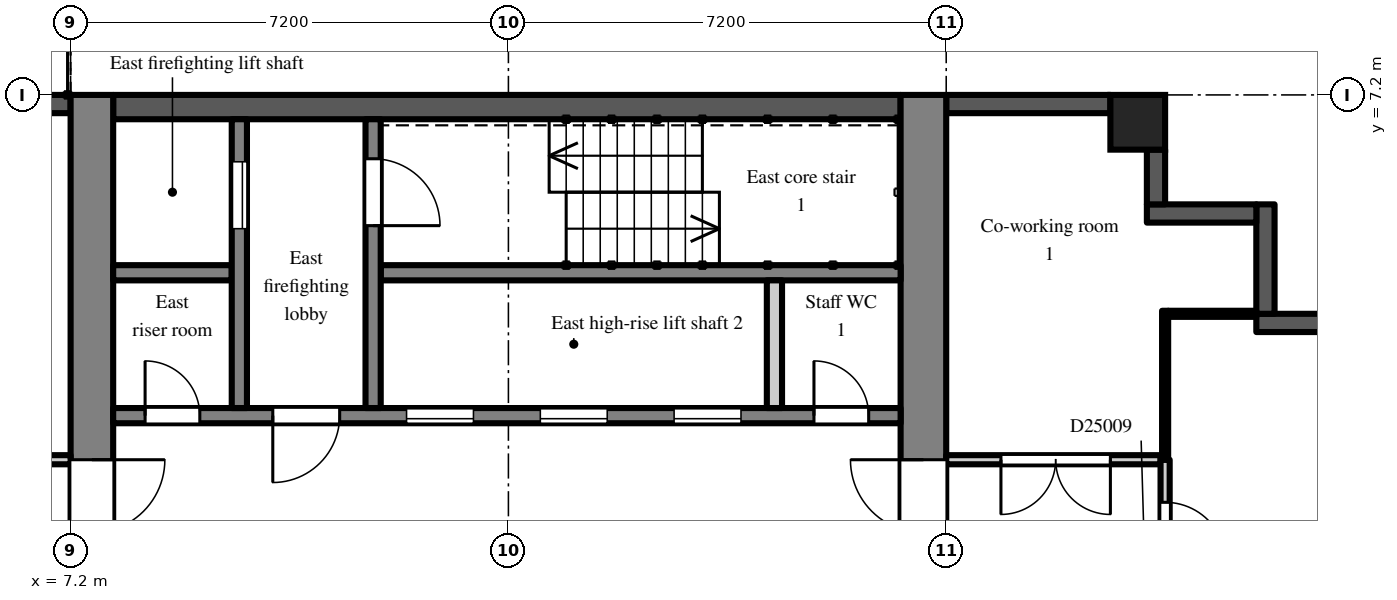
"""IFC4 building model, lengths in metres.
Left out: names, types, materials, properties, quantities, classifications, styles, units other than length and angle.
Written with IfcOpenShell. Run it as: python <this file> out.ifc"""

import sys

from ifc_helpers import new_model, si_unit, direction, frame, frame_2d, origin, origin_2d, place, context, subcontext, project, spatial, rectangle, extrude, element, fill, save


model = new_model("IFC4")
c1 = context("Model", 3, precision=1e-05, world=origin(), true_north=direction((0.0, 1.0)))
c2 = subcontext(c1, "Body", "Model", "MODEL_VIEW")
j1 = project(units=[si_unit("LENGTHUNIT", "METRE"), si_unit("PLANEANGLEUNIT", "RADIAN")], contexts=[c1])
p1 = place(None, origin())
s1 = spatial("IfcSite", under=j1, at=p1, CompositionType="ELEMENT")
p2 = place(p1, origin())
s2 = spatial("IfcBuilding", under=s1, at=p2, CompositionType="ELEMENT")
p3 = place(p2, frame((0.0, 0.0, 170.7)))
s3 = spatial("IfcBuildingStorey", under=s2, at=p3, CompositionType="ELEMENT", Elevation=170.7)
p4 = place(p3, frame((24.75, 6.75, 0.0), z_axis=(0.0, 0.0, 1.0), x_axis=(1.0, 0.0, 0.0)))
e1 = element("IfcColumn", 1, at=p4, inside=s3, PredefinedType="COLUMN", context=c2, shape_type="SweptSolid", body=[
    extrude(rectangle(XDim=0.9, YDim=0.9, at=origin_2d()), origin(), (0.0, 0.0, 1.0), 3.0),
])
p5 = place(p3, frame((27.9, 3.45, 0.0), z_axis=(0.0, 0.0, 1.0), x_axis=(-1.0, 0.0, 0.0)))
e2 = element("IfcWall", 2, at=p5, inside=s3, PredefinedType="SOLIDWALL", context=c2, shape_type="SweptSolid", body=[
    extrude(rectangle(XDim=1.2, YDim=0.3, at=frame_2d((0.6, 0.0))), origin(), (0.0, 0.0, 1.0), 2.6),
])
p6 = place(p3, frame((26.85, 3.6, 0.0), z_axis=(0.0, 0.0, 1.0), x_axis=(0.0, 1.0, 0.0)))
e3 = element("IfcWall", 3, at=p6, inside=s3, PredefinedType="SOLIDWALL", context=c2, shape_type="SweptSolid", body=[
    extrude(rectangle(XDim=1.8, YDim=0.3, at=frame_2d((0.9, 0.0))), origin(), (0.0, 0.0, 1.0), 2.6),
])
p7 = place(p3, frame((26.7, 5.25, 0.0), z_axis=(0.0, 0.0, 1.0), x_axis=(-1.0, 0.0, 0.0)))
e4 = element("IfcWall", 4, at=p7, inside=s3, PredefinedType="SOLIDWALL", context=c2, shape_type="SweptSolid", body=[
    extrude(rectangle(XDim=1.8, YDim=0.3, at=frame_2d((0.9, 0.0))), origin(), (0.0, 0.0, 1.0), 2.6),
])
p8 = place(p3, frame((25.05, 5.4, 0.0), z_axis=(0.0, 0.0, 1.0), x_axis=(0.0, 1.0, 0.0)))
e5 = element("IfcWall", 5, at=p8, inside=s3, PredefinedType="SOLIDWALL", context=c2, shape_type="SweptSolid", body=[
    extrude(rectangle(XDim=0.9, YDim=0.3, at=frame_2d((0.45, 0.0))), origin(), (0.0, 0.0, 1.0), 2.6),
])
p9 = place(p3, frame((24.3, 7.05, 0.0), z_axis=(0.0, 0.0, 1.0), x_axis=(-1.0, 0.0, 0.0)))
e6 = element("IfcWall", 6, at=p9, inside=s3, PredefinedType="SOLIDWALL", context=c2, shape_type="SweptSolid", body=[
    extrude(rectangle(XDim=2.7, YDim=0.3, at=frame_2d((1.35, 0.0))), origin(), (0.0, 0.0, 1.0), 2.2),
])
p10 = place(p3, frame((7.2, 7.05, 0.0), z_axis=(0.0, 0.0, 1.0), x_axis=(-1.0, 0.0, 0.0)))
e7 = element("IfcWall", 7, at=p10, inside=s3, PredefinedType="SOLIDWALL", context=c2, shape_type="SweptSolid", body=[
    extrude(rectangle(XDim=3.0, YDim=0.3, at=frame_2d((1.5, 0.0))), origin(), (0.0, 0.0, 1.0), 2.2),
])
p11 = place(p3, frame((7.55, -7.2, 0.0), z_axis=(0.0, 0.0, 1.0), x_axis=(0.0, 1.0, 0.0)))
e8 = element("IfcWall", 8, at=p11, inside=s3, PredefinedType="SHEAR", context=c2, shape_type="SweptSolid", body=[
    extrude(rectangle(XDim=14.4, YDim=0.7, at=frame_2d((7.2, 0.0))), origin(), (0.0, 0.0, 1.0), 2.6),
])
p12 = place(p11, frame((6.0, 0.0, 0.0)))
e9 = element("IfcOpeningElement", 9, at=p12, cuts=e8, PredefinedType="OPENING", context=c2, shape_type="SweptSolid", body=[
    extrude(rectangle(XDim=2.4, YDim=2.2, at=frame_2d((1.2, 1.1))), frame((0.0, 0.36, 0.0), z_axis=(0.0, -1.0, 0.0), x_axis=(1.0, 0.0, 0.0)), (0.0, 0.0, 1.0), 0.72),
])
p13 = place(p3, frame((21.225, -7.2, 0.0), z_axis=(0.0, 0.0, 1.0), x_axis=(0.0, 1.0, 0.0)))
e10 = element("IfcWall", 10, at=p13, inside=s3, PredefinedType="SHEAR", context=c2, shape_type="SweptSolid", body=[
    extrude(rectangle(XDim=14.4, YDim=0.75, at=frame_2d((7.2, 0.0))), origin(), (0.0, 0.0, 1.0), 2.6),
])
p14 = place(p13, frame((6.0, 0.0, 0.0)))
e11 = element("IfcOpeningElement", 11, at=p14, cuts=e10, PredefinedType="OPENING", context=c2, shape_type="SweptSolid", body=[
    extrude(rectangle(XDim=2.4, YDim=2.2, at=frame_2d((1.2, 1.1))), frame((0.0, 0.385, 0.0), z_axis=(0.0, -1.0, 0.0), x_axis=(1.0, 0.0, 0.0)), (0.0, 0.0, 1.0), 0.77),
])
p15 = place(p3, frame((7.9, 7.0, 0.0), z_axis=(0.0, 0.0, 1.0), x_axis=(1.0, 0.0, 0.0)))
e12 = element("IfcWall", 12, at=p15, inside=s3, PredefinedType="SHEAR", context=c2, shape_type="SweptSolid", body=[
    extrude(rectangle(XDim=12.95, YDim=0.4, at=frame_2d((6.475, 0.0))), origin(), (0.0, 0.0, 1.0), 2.6),
])
p16 = place(p3, frame((7.9, 1.925, 0.0), z_axis=(0.0, 0.0, 1.0), x_axis=(1.0, 0.0, 0.0)))
e13 = element("IfcWall", 13, at=p16, inside=s3, PredefinedType="SHEAR", context=c2, shape_type="SweptSolid", body=[
    extrude(rectangle(XDim=12.95, YDim=0.25, at=frame_2d((6.475, 0.0))), origin(), (0.0, 0.0, 1.0), 2.6),
])
p17 = place(p16, frame((4.825, 0.0, 0.0)))
e14 = element("IfcOpeningElement", 14, at=p17, cuts=e13, PredefinedType="OPENING", context=c2, shape_type="SweptSolid", body=[
    extrude(rectangle(XDim=1.1, YDim=2.1, at=frame_2d((0.55, 1.05))), frame((0.0, 0.135, 0.0), z_axis=(0.0, -1.0, 0.0), x_axis=(1.0, 0.0, 0.0)), (0.0, 0.0, 1.0), 0.27),
])
p18 = place(p16, frame((7.025, 0.0, 0.0)))
e15 = element("IfcOpeningElement", 15, at=p18, cuts=e13, PredefinedType="OPENING", context=c2, shape_type="SweptSolid", body=[
    extrude(rectangle(XDim=1.1, YDim=2.1, at=frame_2d((0.55, 1.05))), frame((0.0, 0.135, 0.0), z_axis=(0.0, -1.0, 0.0), x_axis=(1.0, 0.0, 0.0)), (0.0, 0.0, 1.0), 0.27),
])
p19 = place(p16, frame((9.225, 0.0, 0.0)))
e16 = element("IfcOpeningElement", 16, at=p19, cuts=e13, PredefinedType="OPENING", context=c2, shape_type="SweptSolid", body=[
    extrude(rectangle(XDim=1.1, YDim=2.1, at=frame_2d((0.55, 1.05))), frame((0.0, 0.135, 0.0), z_axis=(0.0, -1.0, 0.0), x_axis=(1.0, 0.0, 0.0)), (0.0, 0.0, 1.0), 0.27),
])
p20 = place(p16, frame((0.525, 0.0, 0.0)))
e17 = element("IfcOpeningElement", 17, at=p20, cuts=e13, PredefinedType="OPENING", context=c2, shape_type="SweptSolid", body=[
    extrude(rectangle(XDim=0.9, YDim=2.1, at=frame_2d((0.45, 1.05))), frame((0.0, 0.135, 0.0), z_axis=(0.0, -1.0, 0.0), x_axis=(1.0, 0.0, 0.0)), (0.0, 0.0, 1.0), 0.27),
])
p21 = place(p16, frame((2.625, 0.0, 0.0)))
e18 = element("IfcOpeningElement", 18, at=p21, cuts=e13, PredefinedType="OPENING", context=c2, shape_type="SweptSolid", body=[
    extrude(rectangle(XDim=1.1, YDim=2.1, at=frame_2d((0.55, 1.05))), frame((0.0, 0.135, 0.0), z_axis=(0.0, -1.0, 0.0), x_axis=(1.0, 0.0, 0.0)), (0.0, 0.0, 1.0), 0.27),
])
p22 = place(p16, frame((11.525, 0.0, 0.0)))
e19 = element("IfcOpeningElement", 19, at=p22, cuts=e13, PredefinedType="OPENING", context=c2, shape_type="SweptSolid", body=[
    extrude(rectangle(XDim=0.9, YDim=2.1, at=frame_2d((0.45, 1.05))), frame((0.0, 0.135, 0.0), z_axis=(0.0, -1.0, 0.0), x_axis=(1.0, 0.0, 0.0)), (0.0, 0.0, 1.0), 0.27),
])
p23 = place(p3, frame((7.9, 4.275, 0.0), z_axis=(0.0, 0.0, 1.0), x_axis=(1.0, 0.0, 0.0)))
e20 = element("IfcWall", 20, at=p23, inside=s3, PredefinedType="SHEAR", context=c2, shape_type="SweptSolid", body=[
    extrude(rectangle(XDim=1.95, YDim=0.25, at=frame_2d((0.975, 0.0))), origin(), (0.0, 0.0, 1.0), 2.6),
])
p24 = place(p3, frame((12.3, 4.275, 0.0), z_axis=(0.0, 0.0, 1.0), x_axis=(1.0, 0.0, 0.0)))
e21 = element("IfcWall", 21, at=p24, inside=s3, PredefinedType="SHEAR", context=c2, shape_type="SweptSolid", body=[
    extrude(rectangle(XDim=8.55, YDim=0.25, at=frame_2d((4.275, 0.0))), origin(), (0.0, 0.0, 1.0), 2.6),
])
p25 = place(p3, frame((9.975, 2.05, 0.0), z_axis=(0.0, 0.0, 1.0), x_axis=(0.0, 1.0, 0.0)))
e22 = element("IfcWall", 22, at=p25, inside=s3, PredefinedType="SHEAR", context=c2, shape_type="SweptSolid", body=[
    extrude(rectangle(XDim=4.75, YDim=0.25, at=frame_2d((2.375, 0.0))), origin(), (0.0, 0.0, 1.0), 2.6),
])
p26 = place(p25, frame((2.95, 0.0, 0.0)))
e23 = element("IfcOpeningElement", 23, at=p26, cuts=e22, PredefinedType="OPENING", context=c2, shape_type="SweptSolid", body=[
    extrude(rectangle(XDim=1.1, YDim=2.1, at=frame_2d((0.55, 1.05))), frame((0.0, 0.135, 0.0), z_axis=(0.0, -1.0, 0.0), x_axis=(1.0, 0.0, 0.0)), (0.0, 0.0, 1.0), 0.27),
])
p27 = place(p3, frame((12.175, 2.05, 0.0), z_axis=(0.0, 0.0, 1.0), x_axis=(0.0, 1.0, 0.0)))
e24 = element("IfcWall", 24, at=p27, inside=s3, PredefinedType="SHEAR", context=c2, shape_type="SweptSolid", body=[
    extrude(rectangle(XDim=4.75, YDim=0.25, at=frame_2d((2.375, 0.0))), origin(), (0.0, 0.0, 1.0), 2.6),
])
p28 = place(p27, frame((3.0, 0.0, 0.0)))
e25 = element("IfcOpeningElement", 25, at=p28, cuts=e24, PredefinedType="OPENING", context=c2, shape_type="SweptSolid", body=[
    extrude(rectangle(XDim=1.1, YDim=2.1, at=frame_2d((0.55, 1.05))), frame((0.0, 0.135, 0.0), z_axis=(0.0, -1.0, 0.0), x_axis=(1.0, 0.0, 0.0)), (0.0, 0.0, 1.0), 0.27),
])
p29 = place(p3, frame((18.775, 2.05, 0.0), z_axis=(0.0, 0.0, 1.0), x_axis=(0.0, 1.0, 0.0)))
e26 = element("IfcWall", 26, at=p29, inside=s3, PredefinedType="PARTITIONING", context=c2, shape_type="SweptSolid", body=[
    extrude(rectangle(XDim=2.1, YDim=0.25, at=frame_2d((1.05, 0.0))), origin(), (0.0, 0.0, 1.0), 2.6),
])
p30 = place(p3, frame((1.275, 1.2, 0.0), z_axis=(0.0, 0.0, 1.0), x_axis=(1.0, 0.0, 0.0)))
e27 = element("IfcWall", 27, at=p30, inside=s3, PredefinedType="PARTITIONING", context=c2, shape_type="SweptSolid", body=[
    extrude(rectangle(XDim=5.925, YDim=0.15, at=frame_2d((2.962, 0.0))), origin(), (0.0, 0.0, 1.0), 2.6),
])
p31 = place(p30, frame((2.025, 0.0, 0.0)))
e28 = element("IfcOpeningElement", 28, at=p31, cuts=e27, PredefinedType="OPENING", context=c2, shape_type="SweptSolid", body=[
    extrude(rectangle(XDim=1.8, YDim=2.1, at=frame_2d((0.9, 1.05))), frame((0.0, 0.085, 0.0), z_axis=(0.0, -1.0, 0.0), x_axis=(1.0, 0.0, 0.0)), (0.0, 0.0, 1.0), 0.17),
])
p32 = place(p3, frame((21.6, 1.2, 0.0), z_axis=(0.0, 0.0, 1.0), x_axis=(1.0, 0.0, 0.0)))
e29 = element("IfcWall", 29, at=p32, inside=s3, PredefinedType="PARTITIONING", context=c2, shape_type="SweptSolid", body=[
    extrude(rectangle(XDim=3.525, YDim=0.15, at=frame_2d((1.762, 0.0))), origin(), (0.0, 0.0, 1.0), 2.6),
])
p33 = place(p32, frame((0.9, 0.0, 0.0)))
e30 = element("IfcOpeningElement", 30, at=p33, cuts=e29, PredefinedType="OPENING", context=c2, shape_type="SweptSolid", body=[
    extrude(rectangle(XDim=1.8, YDim=2.1, at=frame_2d((0.9, 1.05))), frame((0.0, 0.085, 0.0), z_axis=(0.0, -1.0, 0.0), x_axis=(1.0, 0.0, 0.0)), (0.0, 0.0, 1.0), 0.17),
])
p34 = place(p3, frame((25.2, -1.2, 0.0), z_axis=(0.0, 0.0, 1.0), x_axis=(0.0, 1.0, 0.0)))
e31 = element("IfcWall", 31, at=p34, inside=s3, PredefinedType="PARTITIONING", context=c2, shape_type="SweptSolid", body=[
    extrude(rectangle(XDim=2.4, YDim=0.15, at=frame_2d((1.2, 0.0))), origin(), (0.0, 0.0, 1.0), 2.6),
])
p35 = place(p34, frame((0.7, 0.0, 0.0)))
e32 = element("IfcOpeningElement", 32, at=p35, cuts=e31, PredefinedType="OPENING", context=c2, shape_type="SweptSolid", body=[
    extrude(rectangle(XDim=1.0, YDim=2.1, at=frame_2d((0.5, 1.05))), frame((0.0, 0.085, 0.0), z_axis=(0.0, -1.0, 0.0), x_axis=(1.0, 0.0, 0.0)), (0.0, 0.0, 1.0), 0.17),
])
p36 = place(p3, frame((25.2, 1.2, 0.0), z_axis=(0.0, 0.0, 1.0), x_axis=(0.0, 1.0, 0.0)))
e33 = element("IfcWall", 33, at=p36, inside=s3, PredefinedType="PARTITIONING", context=c2, shape_type="SweptSolid", body=[
    extrude(rectangle(XDim=2.45, YDim=0.1, at=frame_2d((1.225, 0.0))), origin(), (0.0, 0.0, 1.0), 2.6),
])
p37 = place(p3, frame((25.25, 3.6, 0.0), z_axis=(0.0, 0.0, 1.0), x_axis=(1.0, 0.0, 0.0)))
e34 = element("IfcWall", 34, at=p37, inside=s3, PredefinedType="PARTITIONING", context=c2, shape_type="SweptSolid", body=[
    extrude(rectangle(XDim=1.45, YDim=0.1, at=frame_2d((0.725, 0.0))), origin(), (0.0, 0.0, 1.0), 2.6),
])
p38 = place(p17, origin())
e35 = element("IfcDoor", 35, at=p38, inside=s3, OperationType="SLIDING_TO_LEFT", PredefinedType="DOOR", context=c2, shape_type="SweptSolid", body=[
    extrude(rectangle(XDim=1.1, YDim=2.1, at=frame_2d((0.55, 1.05))), frame((0.0, 0.025, 0.0), z_axis=(0.0, -1.0, 0.0), x_axis=(1.0, 0.0, 0.0)), (0.0, 0.0, 1.0), 0.05),
])
fill(e14, e35)
p39 = place(p18, origin())
e36 = element("IfcDoor", 36, at=p39, inside=s3, OperationType="SLIDING_TO_LEFT", PredefinedType="DOOR", context=c2, shape_type="SweptSolid", body=[
    extrude(rectangle(XDim=1.1, YDim=2.1, at=frame_2d((0.55, 1.05))), frame((0.0, 0.025, 0.0), z_axis=(0.0, -1.0, 0.0), x_axis=(1.0, 0.0, 0.0)), (0.0, 0.0, 1.0), 0.05),
])
fill(e15, e36)
p40 = place(p19, origin())
e37 = element("IfcDoor", 37, at=p40, inside=s3, OperationType="SLIDING_TO_LEFT", PredefinedType="DOOR", context=c2, shape_type="SweptSolid", body=[
    extrude(rectangle(XDim=1.1, YDim=2.1, at=frame_2d((0.55, 1.05))), frame((0.0, 0.025, 0.0), z_axis=(0.0, -1.0, 0.0), x_axis=(1.0, 0.0, 0.0)), (0.0, 0.0, 1.0), 0.05),
])
fill(e16, e37)
p41 = place(p26, origin())
e38 = element("IfcDoor", 38, at=p41, inside=s3, OperationType="SLIDING_TO_LEFT", PredefinedType="DOOR", context=c2, shape_type="SweptSolid", body=[
    extrude(rectangle(XDim=1.1, YDim=2.1, at=frame_2d((0.55, 1.05))), frame((0.0, 0.025, 0.0), z_axis=(0.0, -1.0, 0.0), x_axis=(1.0, 0.0, 0.0)), (0.0, 0.0, 1.0), 0.05),
])
fill(e23, e38)
p42 = place(p28, frame((1.1, 0.0, 0.0), z_axis=(0.0, 0.0, 1.0), x_axis=(-1.0, 0.0, 0.0)))
e39 = element("IfcDoor", 39, at=p42, inside=s3, OperationType="SINGLE_SWING_RIGHT", PredefinedType="DOOR", context=c2, shape_type="SweptSolid", body=[
    extrude(rectangle(XDim=1.1, YDim=2.1, at=frame_2d((0.55, 1.05))), frame((0.0, 0.025, 0.0), z_axis=(0.0, -1.0, 0.0), x_axis=(1.0, 0.0, 0.0)), (0.0, 0.0, 1.0), 0.05),
])
fill(e25, e39)
p43 = place(p20, origin())
e40 = element("IfcDoor", 40, at=p43, inside=s3, OperationType="SINGLE_SWING_LEFT", PredefinedType="DOOR", context=c2, shape_type="SweptSolid", body=[
    extrude(rectangle(XDim=0.9, YDim=2.1, at=frame_2d((0.45, 1.05))), frame((0.0, 0.025, 0.0), z_axis=(0.0, -1.0, 0.0), x_axis=(1.0, 0.0, 0.0)), (0.0, 0.0, 1.0), 0.05),
])
fill(e17, e40)
p44 = place(p21, frame((1.1, 0.0, 0.0), z_axis=(0.0, 0.0, 1.0), x_axis=(-1.0, 0.0, 0.0)))
e41 = element("IfcDoor", 41, at=p44, inside=s3, OperationType="SINGLE_SWING_RIGHT", PredefinedType="DOOR", context=c2, shape_type="SweptSolid", body=[
    extrude(rectangle(XDim=1.1, YDim=2.1, at=frame_2d((0.55, 1.05))), frame((0.0, 0.025, 0.0), z_axis=(0.0, -1.0, 0.0), x_axis=(1.0, 0.0, 0.0)), (0.0, 0.0, 1.0), 0.05),
])
fill(e18, e41)
p45 = place(p12, frame((2.4, 0.0, 0.0), z_axis=(0.0, 0.0, 1.0), x_axis=(-1.0, 0.0, 0.0)))
e42 = element("IfcDoor", 42, at=p45, inside=s3, OperationType="DOUBLE_DOOR_DOUBLE_SWING", PredefinedType="DOOR", context=c2, shape_type="SweptSolid", body=[
    extrude(rectangle(XDim=2.4, YDim=2.2, at=frame_2d((1.2, 1.1))), frame((0.0, 0.025, 0.0), z_axis=(0.0, -1.0, 0.0), x_axis=(1.0, 0.0, 0.0)), (0.0, 0.0, 1.0), 0.05),
])
fill(e9, e42)
p46 = place(p14, origin())
e43 = element("IfcDoor", 43, at=p46, inside=s3, OperationType="DOUBLE_DOOR_DOUBLE_SWING", PredefinedType="DOOR", context=c2, shape_type="SweptSolid", body=[
    extrude(rectangle(XDim=2.4, YDim=2.2, at=frame_2d((1.2, 1.1))), frame((0.0, 0.025, 0.0), z_axis=(0.0, -1.0, 0.0), x_axis=(1.0, 0.0, 0.0)), (0.0, 0.0, 1.0), 0.05),
])
fill(e11, e43)
p47 = place(p22, origin())
e44 = element("IfcDoor", 44, at=p47, inside=s3, OperationType="SINGLE_SWING_LEFT", PredefinedType="DOOR", context=c2, shape_type="SweptSolid", body=[
    extrude(rectangle(XDim=0.9, YDim=2.1, at=frame_2d((0.45, 1.05))), frame((0.0, 0.025, 0.0), z_axis=(0.0, -1.0, 0.0), x_axis=(1.0, 0.0, 0.0)), (0.0, 0.0, 1.0), 0.05),
])
fill(e19, e44)
p48 = place(p35, frame((1.0, 0.0, 0.0), z_axis=(0.0, 0.0, 1.0), x_axis=(-1.0, 0.0, 0.0)))
e45 = element("IfcDoor", 45, at=p48, inside=s3, OperationType="SINGLE_SWING_RIGHT", PredefinedType="DOOR", context=c2, shape_type="SweptSolid", body=[
    extrude(rectangle(XDim=1.0, YDim=2.1, at=frame_2d((0.5, 1.05))), frame((0.0, 0.025, 0.0), z_axis=(0.0, -1.0, 0.0), x_axis=(1.0, 0.0, 0.0)), (0.0, 0.0, 1.0), 0.05),
])
fill(e32, e45)
p49 = place(p33, frame((1.8, 0.0, 0.0), z_axis=(0.0, 0.0, 1.0), x_axis=(-1.0, 0.0, 0.0)))
e46 = element("IfcDoor", 46, at=p49, inside=s3, OperationType="DOUBLE_DOOR_DOUBLE_SWING", PredefinedType="DOOR", context=c2, shape_type="SweptSolid", body=[
    extrude(rectangle(XDim=1.8, YDim=2.1, at=frame_2d((0.9, 1.05))), frame((0.0, 0.025, 0.0), z_axis=(0.0, -1.0, 0.0), x_axis=(1.0, 0.0, 0.0)), (0.0, 0.0, 1.0), 0.05),
])
fill(e30, e46)
save(model, sys.argv[1])
